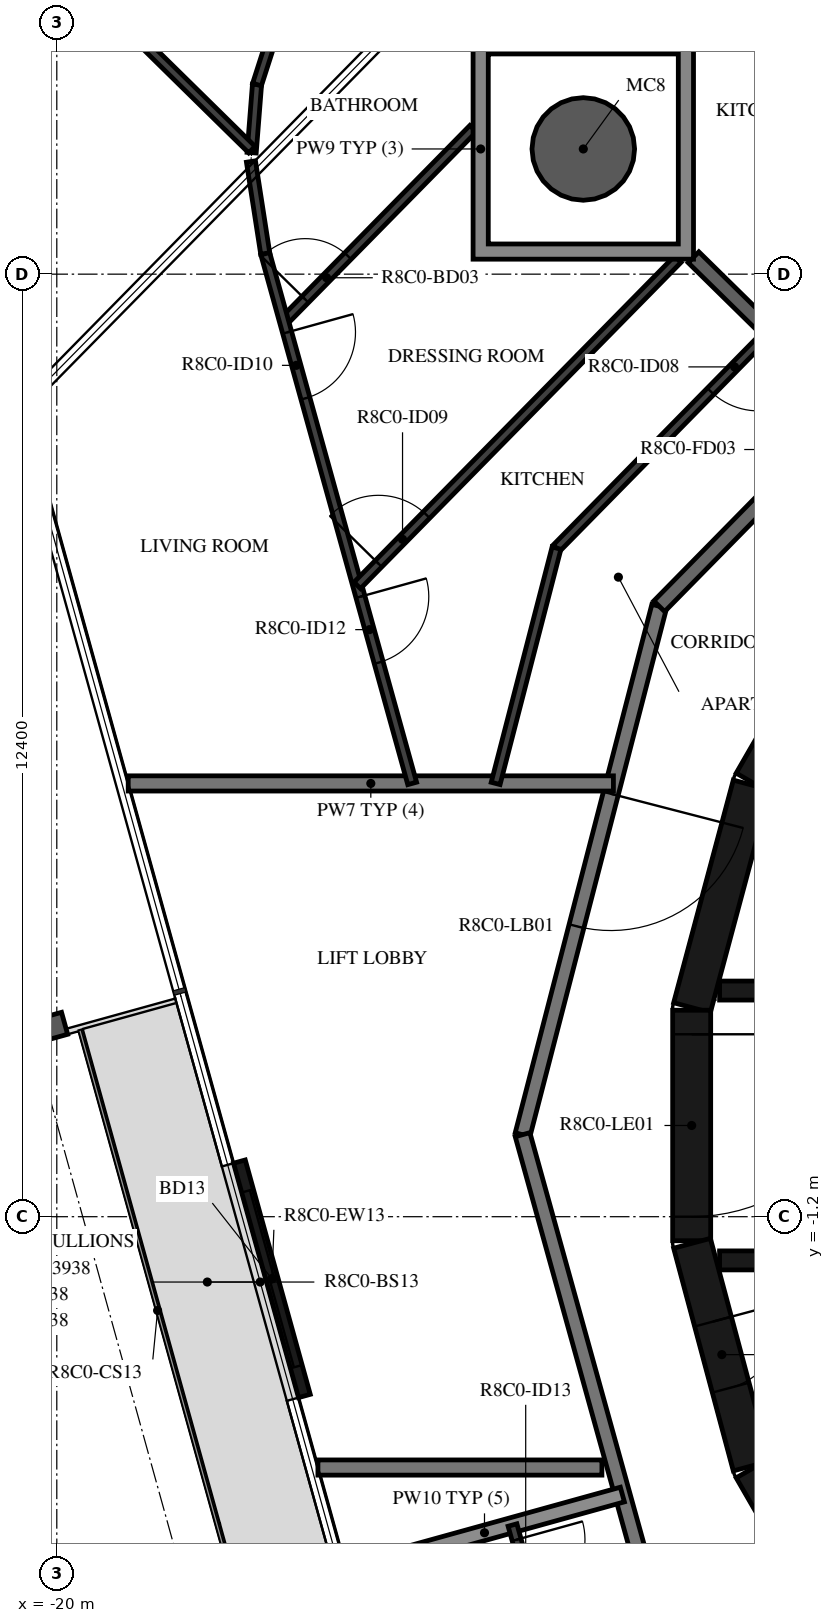
"""IFC4 building model, lengths in metres.
Left out: names, types, materials, properties, quantities, classifications, styles, units other than length and angle.
Written with IfcOpenShell. Run it as: python <this file> out.ifc"""

import sys

from ifc_helpers import new_model, si_unit, direction, frame, frame_2d, origin, origin_2d, place, context, subcontext, project, spatial, polyline, rectangle, hollow_circle, i_section, outline, extrude, element, fill, save


model = new_model("IFC4")
c1 = context("Model", 3, precision=1e-05, world=origin(), true_north=direction((0.0, 1.0)))
c2 = subcontext(c1, "Body", "Model", "MODEL_VIEW")
j1 = project(units=[si_unit("LENGTHUNIT", "METRE"), si_unit("PLANEANGLEUNIT", "RADIAN")], contexts=[c1])
p1 = place(None, origin())
s1 = spatial("IfcSite", under=j1, at=p1, CompositionType="ELEMENT")
p2 = place(p1, origin())
s2 = spatial("IfcBuilding", under=s1, at=p2, CompositionType="ELEMENT")
p3 = place(p2, frame((0.0, 0.0, 319.2)))
s3 = spatial("IfcBuildingStorey", under=s2, at=p3, CompositionType="ELEMENT", Elevation=319.2)
p4 = place(p3, frame((-13.073, 12.847, -0.38), z_axis=(0.0, 0.0, 1.0), x_axis=(1.0, 0.0, 0.0)))
e1 = element("IfcColumn", 1, at=p4, inside=s3, PredefinedType="COLUMN", context=c2, shape_type="SweptSolid", body=[
    extrude(hollow_circle(Radius=0.675, WallThickness=0.03, at=origin_2d()), origin(), (0.0, 0.0, 1.0), 3.5),
])
p5 = place(p3, frame((-20.331, 1.224, -0.38), z_axis=(0.0, 0.0, 1.0), x_axis=(-0.267238143562, 0.963630517691, 0.0)))
e2 = element("IfcColumn", 2, at=p5, inside=s3, PredefinedType="COLUMN", context=c2, shape_type="SweptSolid", body=[
    extrude(i_section(OverallWidth=0.3, OverallDepth=0.9, WebThickness=0.019, FlangeThickness=0.035, FilletRadius=0.03, at=origin_2d()), origin(), (0.0, 0.0, 1.0), 3.5),
])
p6 = place(p3, frame((-17.598, -0.475, 0.0), z_axis=(0.0, 0.0, 1.0), x_axis=(0.267266077957, -0.963622770369, 0.0)))
e3 = element("IfcWall", 3, at=p6, inside=s3, PredefinedType="STANDARD", context=c2, shape_type="SweptSolid", body=[
    extrude(rectangle(XDim=3.2, YDim=0.16, at=frame_2d((1.6, 0.0))), origin(), (0.0, 0.0, 1.0), 3.12),
])
p7 = place(p6, frame((0.4, 0.0, 0.0)))
e4 = element("IfcOpeningElement", 4, at=p7, cuts=e3, PredefinedType="OPENING", context=c2, shape_type="SweptSolid", body=[
    extrude(rectangle(XDim=2.4, YDim=2.4, at=frame_2d((1.2, 1.2))), frame((0.0, 0.09, 0.0), z_axis=(0.0, -1.0, 0.0), x_axis=(1.0, 0.0, 0.0)), (0.0, 0.0, 1.0), 0.18),
])
for number, where, z_axis, x_axis in (
    (5, (-9.329, 7.137, 0.0), (0.0, 0.0, 1.0), (-0.5, -0.866, 0.0)),
    (6, (-10.858, 4.479, 0.0), (0.0, 0.0, 1.0), (-0.259, -0.966, 0.0)),
):
    element("IfcWall", number, at=place(p3, frame(where, z_axis=z_axis, x_axis=x_axis)), inside=s3, PredefinedType="SHEAR", context=c2, shape_type="SweptSolid", body=[
        extrude(rectangle(XDim=3.033, YDim=0.5, at=frame_2d((1.516, 0.0))), origin(), (0.0, 0.0, 1.0), 3.12),
    ])
p8 = place(p3, frame((-11.647, 1.516, 0.0), z_axis=(0.0, 0.0, 1.0), x_axis=(0.0, -1.0, 0.0)))
e7 = element("IfcWall", 7, at=p8, inside=s3, PredefinedType="SHEAR", context=c2, shape_type="SweptSolid", body=[
    extrude(rectangle(XDim=3.033, YDim=0.5, at=frame_2d((1.516, 0.0))), origin(), (0.0, 0.0, 1.0), 3.12),
])
p9 = place(p8, frame((0.316, 0.0, 0.0)))
e8 = element("IfcOpeningElement", 8, at=p9, cuts=e7, PredefinedType="OPENING", context=c2, shape_type="SweptSolid", body=[
    extrude(rectangle(XDim=2.4, YDim=2.1, at=frame_2d((1.2, 1.05))), frame((0.0, 0.26, 0.0), z_axis=(0.0, -1.0, 0.0), x_axis=(1.0, 0.0, 0.0)), (0.0, 0.0, 1.0), 0.52),
])
p10 = place(p3, frame((-11.643, -1.55, 0.0), z_axis=(0.0, 0.0, 1.0), x_axis=(0.258734743916, -0.965948410781, 0.0)))
e9 = element("IfcWall", 9, at=p10, inside=s3, PredefinedType="SHEAR", context=c2, shape_type="SweptSolid", body=[
    extrude(rectangle(XDim=3.033, YDim=0.5, at=frame_2d((1.516, 0.0))), origin(), (0.0, 0.0, 1.0), 3.12),
])
p11 = place(p10, frame((1.066, 0.0, 0.0)))
e10 = element("IfcOpeningElement", 10, at=p11, cuts=e9, PredefinedType="OPENING", context=c2, shape_type="SweptSolid", body=[
    extrude(rectangle(XDim=0.9, YDim=2.1, at=frame_2d((0.45, 1.05))), frame((0.0, 0.26, 0.0), z_axis=(0.0, -1.0, 0.0), x_axis=(1.0, 0.0, 0.0)), (0.0, 0.0, 1.0), 0.52),
])
p12 = place(p3, frame((-10.845, -4.51, 0.0), z_axis=(0.0, 0.0, 1.0), x_axis=(0.500087131594, -0.865975092491, 0.0)))
e11 = element("IfcWall", 11, at=p12, inside=s3, PredefinedType="SHEAR", context=c2, shape_type="SweptSolid", body=[
    extrude(rectangle(XDim=3.033, YDim=0.5, at=frame_2d((1.516, 0.0))), origin(), (0.0, 0.0, 1.0), 3.12),
])
p13 = place(p3, frame((-11.28, 1.775, 0.0), z_axis=(0.0, 0.0, 1.0), x_axis=(1.0, 0.0, 0.0)))
e12 = element("IfcWall", 12, at=p13, inside=s3, PredefinedType="SHEAR", context=c2, shape_type="SweptSolid", body=[
    extrude(rectangle(XDim=14.38, YDim=0.25, at=frame_2d((7.19, 0.0))), origin(), (0.0, 0.0, 1.0), 3.12),
])
p14 = place(p13, frame((3.305, 0.0, 0.0)))
e13 = element("IfcOpeningElement", 13, at=p14, cuts=e12, PredefinedType="OPENING", context=c2, shape_type="SweptSolid", body=[
    extrude(rectangle(XDim=0.9, YDim=2.1, at=frame_2d((0.45, 1.05))), frame((0.0, 0.135, 0.0), z_axis=(0.0, -1.0, 0.0), x_axis=(1.0, 0.0, 0.0)), (0.0, 0.0, 1.0), 0.27),
])
p15 = place(p13, frame((9.755, 0.0, 0.0)))
e14 = element("IfcOpeningElement", 14, at=p15, cuts=e12, PredefinedType="OPENING", context=c2, shape_type="SweptSolid", body=[
    extrude(rectangle(XDim=0.9, YDim=2.1, at=frame_2d((0.45, 1.05))), frame((0.0, 0.135, 0.0), z_axis=(0.0, -1.0, 0.0), x_axis=(1.0, 0.0, 0.0)), (0.0, 0.0, 1.0), 0.27),
])
p16 = place(p3, frame((-11.28, -1.775, 0.0), z_axis=(0.0, 0.0, 1.0), x_axis=(1.0, 0.0, 0.0)))
e15 = element("IfcWall", 15, at=p16, inside=s3, PredefinedType="SHEAR", context=c2, shape_type="SweptSolid", body=[
    extrude(rectangle(XDim=14.38, YDim=0.25, at=frame_2d((7.19, 0.0))), origin(), (0.0, 0.0, 1.0), 3.12),
])
p17 = place(p16, frame((6.43, 0.0, 0.0)))
e16 = element("IfcOpeningElement", 16, at=p17, cuts=e15, PredefinedType="OPENING", context=c2, shape_type="SweptSolid", body=[
    extrude(rectangle(XDim=1.1, YDim=2.1, at=frame_2d((0.55, 1.05))), frame((0.0, 0.135, 0.0), z_axis=(0.0, -1.0, 0.0), x_axis=(1.0, 0.0, 0.0)), (0.0, 0.0, 1.0), 0.27),
])
p18 = place(p16, frame((8.58, 0.0, 0.0)))
e17 = element("IfcOpeningElement", 17, at=p18, cuts=e15, PredefinedType="OPENING", context=c2, shape_type="SweptSolid", body=[
    extrude(rectangle(XDim=1.1, YDim=2.1, at=frame_2d((0.55, 1.05))), frame((0.0, 0.135, 0.0), z_axis=(0.0, -1.0, 0.0), x_axis=(1.0, 0.0, 0.0)), (0.0, 0.0, 1.0), 0.27),
])
p19 = place(p16, frame((10.73, 0.0, 0.0)))
e18 = element("IfcOpeningElement", 18, at=p19, cuts=e15, PredefinedType="OPENING", context=c2, shape_type="SweptSolid", body=[
    extrude(rectangle(XDim=1.1, YDim=2.1, at=frame_2d((0.55, 1.05))), frame((0.0, 0.135, 0.0), z_axis=(0.0, -1.0, 0.0), x_axis=(1.0, 0.0, 0.0)), (0.0, 0.0, 1.0), 0.27),
])
p20 = place(p16, frame((3.305, 0.0, 0.0)))
e19 = element("IfcOpeningElement", 19, at=p20, cuts=e15, PredefinedType="OPENING", context=c2, shape_type="SweptSolid", body=[
    extrude(rectangle(XDim=0.9, YDim=2.1, at=frame_2d((0.45, 1.05))), frame((0.0, 0.135, 0.0), z_axis=(0.0, -1.0, 0.0), x_axis=(1.0, 0.0, 0.0)), (0.0, 0.0, 1.0), 0.27),
])
p21 = place(p16, frame((12.98, 0.0, 0.0)))
e20 = element("IfcOpeningElement", 20, at=p21, cuts=e15, PredefinedType="OPENING", context=c2, shape_type="SweptSolid", body=[
    extrude(rectangle(XDim=0.9, YDim=2.1, at=frame_2d((0.45, 1.05))), frame((0.0, 0.135, 0.0), z_axis=(0.0, -1.0, 0.0), x_axis=(1.0, 0.0, 0.0)), (0.0, 0.0, 1.0), 0.27),
])
p22 = place(p3, frame((-12.074, 6.831, 0.0), z_axis=(0.0, 0.0, 1.0), x_axis=(-0.250391063186, -0.968144780225, 0.0)))
e21 = element("IfcWall", 21, at=p22, inside=s3, PredefinedType="STANDARD", context=c2, shape_type="SweptSolid", body=[
    extrude(rectangle(XDim=7.181, YDim=0.2, at=frame_2d((3.591, 0.0))), origin(), (0.0, 0.0, 1.0), 3.12),
])
p23 = place(p22, frame((2.548, 0.0, 0.0)))
e22 = element("IfcOpeningElement", 22, at=p23, cuts=e21, PredefinedType="OPENING", context=c2, shape_type="SweptSolid", body=[
    extrude(rectangle(XDim=1.8, YDim=2.1, at=frame_2d((0.9, 1.05))), frame((0.0, 0.11, 0.0), z_axis=(0.0, -1.0, 0.0), x_axis=(1.0, 0.0, 0.0)), (0.0, 0.0, 1.0), 0.22),
])
p24 = place(p3, frame((-13.872, -0.121, 0.0), z_axis=(0.0, 0.0, 1.0), x_axis=(0.267254575108, -0.963625960674, 0.0)))
e23 = element("IfcWall", 23, at=p24, inside=s3, PredefinedType="STANDARD", context=c2, shape_type="SweptSolid", body=[
    extrude(rectangle(XDim=7.181, YDim=0.2, at=frame_2d((3.591, 0.0))), origin(), (0.0, 0.0, 1.0), 3.12),
])
p25 = place(p3, frame((-7.041, 11.953, 0.0), z_axis=(0.0, 0.0, 1.0), x_axis=(-0.70090916255, -0.713250549143, 0.0)))
e24 = element("IfcWall", 24, at=p25, inside=s3, PredefinedType="STANDARD", context=c2, shape_type="SweptSolid", body=[
    extrude(rectangle(XDim=7.181, YDim=0.2, at=frame_2d((3.59, 0.0))), origin(), (0.0, 0.0, 1.0), 3.12),
])
p26 = place(p25, frame((2.39, 0.0, 0.0)))
e25 = element("IfcOpeningElement", 25, at=p26, cuts=e24, PredefinedType="OPENING", context=c2, shape_type="SweptSolid", body=[
    extrude(rectangle(XDim=1.0, YDim=2.1, at=frame_2d((0.5, 1.05))), frame((0.0, 0.11, 0.0), z_axis=(0.0, -1.0, 0.0), x_axis=(1.0, 0.0, 0.0)), (0.0, 0.0, 1.0), 0.22),
])
p27 = place(p25, frame((3.791, 0.0, 0.0)))
e26 = element("IfcOpeningElement", 26, at=p27, cuts=e24, PredefinedType="OPENING", context=c2, shape_type="SweptSolid", body=[
    extrude(rectangle(XDim=1.0, YDim=2.1, at=frame_2d((0.5, 1.05))), frame((0.0, 0.11, 0.0), z_axis=(0.0, -1.0, 0.0), x_axis=(1.0, 0.0, 0.0)), (0.0, 0.0, 1.0), 0.22),
])
p28 = place(p3, frame((-12.677, 4.5, 0.0), z_axis=(0.0, 0.0, 1.0), x_axis=(-1.0, 0.0, 0.0)))
e27 = element("IfcWall", 27, at=p28, inside=s3, PredefinedType="STANDARD", context=c2, shape_type="SweptSolid", body=[
    extrude(rectangle(XDim=6.383, YDim=0.2, at=frame_2d((3.192, 0.0))), origin(), (0.0, 0.0, 1.0), 3.12),
])
p29 = place(p3, frame((-16.564, -4.5, 0.0), z_axis=(0.0, 0.0, 1.0), x_axis=(1.0, 0.0, 0.0)))
e28 = element("IfcWall", 28, at=p29, inside=s3, PredefinedType="STANDARD", context=c2, shape_type="SweptSolid", body=[
    extrude(rectangle(XDim=3.736, YDim=0.2, at=frame_2d((1.868, 0.0))), origin(), (0.0, 0.0, 1.0), 3.12),
])
p30 = place(p3, frame((-11.623, 11.422, 0.0), z_axis=(0.0, 0.0, 1.0), x_axis=(0.713233657229, -0.700926351478, 0.0)))
e29 = element("IfcWall", 29, at=p30, inside=s3, PredefinedType="STANDARD", context=c2, shape_type="SweptSolid", body=[
    extrude(rectangle(XDim=2.896, YDim=0.2, at=frame_2d((1.448, 0.0))), origin(), (0.0, 0.0, 1.0), 3.12),
])
p31 = place(p3, frame((-16.187, -5.862, 0.0), z_axis=(0.0, 0.0, 1.0), x_axis=(0.963631166683, 0.267235803358, 0.0)))
e30 = element("IfcWall", 30, at=p31, inside=s3, PredefinedType="STANDARD", context=c2, shape_type="SweptSolid", body=[
    extrude(rectangle(XDim=3.765, YDim=0.2, at=frame_2d((1.882, 0.0))), origin(), (0.0, 0.0, 1.0), 2.73),
])
p32 = place(p3, frame((-8.413, 12.698, 0.0), z_axis=(0.0, 0.0, 1.0), x_axis=(-0.700901588882, -0.713257991686, 0.0)))
e31 = element("IfcWall", 31, at=p32, inside=s3, PredefinedType="PARTITIONING", context=c2, shape_type="SweptSolid", body=[
    extrude(rectangle(XDim=7.153, YDim=0.12, at=frame_2d((3.576, 0.0))), origin(), (0.0, 0.0, 1.0), 3.12),
])
p33 = place(p32, frame((3.36, 0.0, 0.0)))
e32 = element("IfcOpeningElement", 32, at=p33, cuts=e31, PredefinedType="OPENING", context=c2, shape_type="SweptSolid", body=[
    extrude(rectangle(XDim=0.9, YDim=2.1, at=frame_2d((0.45, 1.05))), frame((0.0, 0.07, 0.0), z_axis=(0.0, -1.0, 0.0), x_axis=(1.0, 0.0, 0.0)), (0.0, 0.0, 1.0), 0.14),
])
p34 = place(p3, frame((-13.426, 7.596, 0.0), z_axis=(0.0, 0.0, 1.0), x_axis=(-0.250342106136, -0.968157440655, 0.0)))
e33 = element("IfcWall", 33, at=p34, inside=s3, PredefinedType="PARTITIONING", context=c2, shape_type="SweptSolid", body=[
    extrude(rectangle(XDim=3.198, YDim=0.12, at=frame_2d((1.599, 0.0))), origin(), (0.0, 0.0, 1.0), 3.12),
])
p35 = place(p3, frame((-17.437, 12.798, 0.0), z_axis=(0.0, 0.0, 1.0), x_axis=(0.078482315782, 0.996915506003, 0.0)))
e34 = element("IfcWall", 34, at=p35, inside=s3, PredefinedType="PARTITIONING", context=c2, shape_type="SweptSolid", body=[
    extrude(rectangle(XDim=0.899, YDim=0.12, at=frame_2d((0.449, 0.0))), origin(), (0.0, 0.0, 1.0), 3.12),
])
p36 = place(p3, frame((-17.366, 13.695, 0.0), z_axis=(0.0, 0.0, 1.0), x_axis=(0.306405887477, 0.951900957096, 0.0)))
e35 = element("IfcWall", 35, at=p36, inside=s3, PredefinedType="PARTITIONING", context=c2, shape_type="SweptSolid", body=[
    extrude(rectangle(XDim=1.016, YDim=0.12, at=frame_2d((0.508, 0.0))), origin(), (0.0, 0.0, 1.0), 3.12),
])
p37 = place(p3, frame((-20.465, 15.817, 0.0), z_axis=(0.0, 0.0, 1.0), x_axis=(0.713254811643, -0.700904824971, 0.0)))
e36 = element("IfcWall", 36, at=p37, inside=s3, PredefinedType="PARTITIONING", context=c2, shape_type="SweptSolid", body=[
    extrude(rectangle(XDim=4.25, YDim=0.12, at=frame_2d((2.125, 0.0))), origin(), (0.0, 0.0, 1.0), 3.12),
])
p38 = place(p37, frame((0.4, 0.0, 0.0)))
e37 = element("IfcOpeningElement", 37, at=p38, cuts=e36, PredefinedType="OPENING", context=c2, shape_type="SweptSolid", body=[
    extrude(rectangle(XDim=0.9, YDim=2.1, at=frame_2d((0.45, 1.05))), frame((0.0, 0.07, 0.0), z_axis=(0.0, -1.0, 0.0), x_axis=(1.0, 0.0, 0.0)), (0.0, 0.0, 1.0), 0.14),
])
p39 = place(p3, frame((-17.011, 10.582, 0.0), z_axis=(0.0, 0.0, 1.0), x_axis=(0.700924288011, 0.713235685083, 0.0)))
e38 = element("IfcWall", 38, at=p39, inside=s3, PredefinedType="PARTITIONING", context=c2, shape_type="SweptSolid", body=[
    extrude(rectangle(XDim=3.55, YDim=0.12, at=frame_2d((1.775, 0.0))), origin(), (0.0, 0.0, 1.0), 3.12),
])
p40 = place(p39, frame((0.4, 0.0, 0.0)))
e39 = element("IfcOpeningElement", 39, at=p40, cuts=e38, PredefinedType="OPENING", context=c2, shape_type="SweptSolid", body=[
    extrude(rectangle(XDim=0.8, YDim=2.1, at=frame_2d((0.4, 1.05))), frame((0.0, 0.07, 0.0), z_axis=(0.0, -1.0, 0.0), x_axis=(1.0, 0.0, 0.0)), (0.0, 0.0, 1.0), 0.14),
])
p41 = place(p3, frame((-17.446, 12.682, 0.0), z_axis=(0.0, 0.0, 1.0), x_axis=(0.153612025092, -0.988131239131, 0.0)))
e40 = element("IfcWall", 40, at=p41, inside=s3, PredefinedType="PARTITIONING", context=c2, shape_type="SweptSolid", body=[
    extrude(rectangle(XDim=1.227, YDim=0.12, at=frame_2d((0.614, 0.0))), origin(), (0.0, 0.0, 1.0), 3.12),
])
p42 = place(p3, frame((-17.257, 11.469, 0.0), z_axis=(0.0, 0.0, 1.0), x_axis=(0.267222501114, -0.963634855585, 0.0)))
e41 = element("IfcWall", 41, at=p42, inside=s3, PredefinedType="PARTITIONING", context=c2, shape_type="SweptSolid", body=[
    extrude(rectangle(XDim=7.232, YDim=0.12, at=frame_2d((3.616, 0.0))), origin(), (0.0, 0.0, 1.0), 3.12),
])
p43 = place(p42, frame((1.074, 0.0, 0.0)))
e42 = element("IfcOpeningElement", 42, at=p43, cuts=e41, PredefinedType="OPENING", context=c2, shape_type="SweptSolid", body=[
    extrude(rectangle(XDim=0.9, YDim=2.1, at=frame_2d((0.45, 1.05))), frame((0.0, 0.07, 0.0), z_axis=(0.0, -1.0, 0.0), x_axis=(1.0, 0.0, 0.0)), (0.0, 0.0, 1.0), 0.14),
])
p44 = place(p42, frame((4.682, 0.0, 0.0)))
e43 = element("IfcOpeningElement", 43, at=p44, cuts=e41, PredefinedType="OPENING", context=c2, shape_type="SweptSolid", body=[
    extrude(rectangle(XDim=0.9, YDim=2.1, at=frame_2d((0.45, 1.05))), frame((0.0, 0.07, 0.0), z_axis=(0.0, -1.0, 0.0), x_axis=(1.0, 0.0, 0.0)), (0.0, 0.0, 1.0), 0.14),
])
p45 = place(p3, frame((-16.047, 7.105, 0.0), z_axis=(0.0, 0.0, 1.0), x_axis=(0.700892382646, 0.713267038316, 0.0)))
e44 = element("IfcWall", 44, at=p45, inside=s3, PredefinedType="PARTITIONING", context=c2, shape_type="SweptSolid", body=[
    extrude(rectangle(XDim=6.017, YDim=0.12, at=frame_2d((3.009, 0.0))), origin(), (0.0, 0.0, 1.0), 3.12),
])
p46 = place(p45, frame((0.4, 0.0, 0.0)))
e45 = element("IfcOpeningElement", 45, at=p46, cuts=e44, PredefinedType="OPENING", context=c2, shape_type="SweptSolid", body=[
    extrude(rectangle(XDim=0.9, YDim=2.1, at=frame_2d((0.45, 1.05))), frame((0.0, 0.07, 0.0), z_axis=(0.0, -1.0, 0.0), x_axis=(1.0, 0.0, 0.0)), (0.0, 0.0, 1.0), 0.14),
])
p47 = place(p3, frame((-14.005, -5.256, 0.0), z_axis=(0.0, 0.0, 1.0), x_axis=(0.267200500487, -0.963640956238, 0.0)))
e46 = element("IfcWall", 46, at=p47, inside=s3, PredefinedType="PARTITIONING", context=c2, shape_type="SweptSolid", body=[
    extrude(rectangle(XDim=2.67, YDim=0.12, at=frame_2d((1.335, 0.0))), origin(), (0.0, 0.0, 1.0), 3.12),
])
p48 = place(p47, frame((0.2, 0.0, 0.0)))
e47 = element("IfcOpeningElement", 47, at=p48, cuts=e46, PredefinedType="OPENING", context=c2, shape_type="SweptSolid", body=[
    extrude(rectangle(XDim=0.9, YDim=2.1, at=frame_2d((0.45, 1.05))), frame((0.0, 0.07, 0.0), z_axis=(0.0, -1.0, 0.0), x_axis=(1.0, 0.0, 0.0)), (0.0, 0.0, 1.0), 0.14),
])
p49 = place(p3, origin())
e48 = element("IfcWall", 48, at=p49, inside=s3, PredefinedType="STANDARD", context=c2, shape_type="SweptSolid", body=[
    extrude(outline(polyline([(-11.623, 14.297), (-11.623, 11.397), (-14.523, 11.397), (-14.523, 14.297), (-11.623, 14.297)]), holes=[polyline([(-14.323, 11.597), (-11.823, 11.597), (-11.823, 14.097), (-14.323, 14.097), (-14.323, 11.597)])]), origin(), (0.0, 0.0, 1.0), 3.12),
])
p50 = place(p7, origin())
e49 = element("IfcDoor", 49, at=p50, inside=s3, OperationType="DOUBLE_DOOR_SLIDING", PredefinedType="DOOR", context=c2, shape_type="SweptSolid", body=[
    extrude(rectangle(XDim=2.4, YDim=2.4, at=frame_2d((1.2, 1.2))), frame((0.0, 0.025, 0.0), z_axis=(0.0, -1.0, 0.0), x_axis=(1.0, 0.0, 0.0)), (0.0, 0.0, 1.0), 0.05),
])
fill(e4, e49)
p51 = place(p9, origin())
e50 = element("IfcDoor", 50, at=p51, inside=s3, OperationType="DOUBLE_DOOR_SINGLE_SWING", PredefinedType="DOOR", context=c2, shape_type="SweptSolid", body=[
    extrude(rectangle(XDim=2.4, YDim=2.1, at=frame_2d((1.2, 1.05))), frame((0.0, 0.025, 0.0), z_axis=(0.0, -1.0, 0.0), x_axis=(1.0, 0.0, 0.0)), (0.0, 0.0, 1.0), 0.05),
])
fill(e8, e50)
p52 = place(p11, origin())
e51 = element("IfcDoor", 51, at=p52, inside=s3, OperationType="SINGLE_SWING_RIGHT", PredefinedType="DOOR", context=c2, shape_type="SweptSolid", body=[
    extrude(rectangle(XDim=0.9, YDim=2.1, at=frame_2d((0.45, 1.05))), frame((0.0, 0.025, 0.0), z_axis=(0.0, -1.0, 0.0), x_axis=(1.0, 0.0, 0.0)), (0.0, 0.0, 1.0), 0.05),
])
fill(e10, e51)
p53 = place(p33, origin())
e52 = element("IfcDoor", 52, at=p53, inside=s3, OperationType="SINGLE_SWING_LEFT", PredefinedType="DOOR", context=c2, shape_type="SweptSolid", body=[
    extrude(rectangle(XDim=0.9, YDim=2.1, at=frame_2d((0.45, 1.05))), frame((0.0, 0.025, 0.0), z_axis=(0.0, -1.0, 0.0), x_axis=(1.0, 0.0, 0.0)), (0.0, 0.0, 1.0), 0.05),
])
fill(e32, e52)
p54 = place(p46, origin())
e53 = element("IfcDoor", 53, at=p54, inside=s3, OperationType="SINGLE_SWING_LEFT", PredefinedType="DOOR", context=c2, shape_type="SweptSolid", body=[
    extrude(rectangle(XDim=0.9, YDim=2.1, at=frame_2d((0.45, 1.05))), frame((0.0, 0.025, 0.0), z_axis=(0.0, -1.0, 0.0), x_axis=(1.0, 0.0, 0.0)), (0.0, 0.0, 1.0), 0.05),
])
fill(e45, e53)
p55 = place(p40, origin())
e54 = element("IfcDoor", 54, at=p55, inside=s3, OperationType="SINGLE_SWING_LEFT", PredefinedType="DOOR", context=c2, shape_type="SweptSolid", body=[
    extrude(rectangle(XDim=0.8, YDim=2.1, at=frame_2d((0.4, 1.05))), frame((0.0, 0.025, 0.0), z_axis=(0.0, -1.0, 0.0), x_axis=(1.0, 0.0, 0.0)), (0.0, 0.0, 1.0), 0.05),
])
fill(e39, e54)
p56 = place(p43, origin())
e55 = element("IfcDoor", 55, at=p56, inside=s3, OperationType="SINGLE_SWING_LEFT", PredefinedType="DOOR", context=c2, shape_type="SweptSolid", body=[
    extrude(rectangle(XDim=0.9, YDim=2.1, at=frame_2d((0.45, 1.05))), frame((0.0, 0.025, 0.0), z_axis=(0.0, -1.0, 0.0), x_axis=(1.0, 0.0, 0.0)), (0.0, 0.0, 1.0), 0.05),
])
fill(e42, e55)
p57 = place(p44, origin())
e56 = element("IfcDoor", 56, at=p57, inside=s3, OperationType="SINGLE_SWING_RIGHT", PredefinedType="DOOR", context=c2, shape_type="SweptSolid", body=[
    extrude(rectangle(XDim=0.9, YDim=2.1, at=frame_2d((0.45, 1.05))), frame((0.0, 0.025, 0.0), z_axis=(0.0, -1.0, 0.0), x_axis=(1.0, 0.0, 0.0)), (0.0, 0.0, 1.0), 0.05),
])
fill(e43, e56)
p58 = place(p48, origin())
e57 = element("IfcDoor", 57, at=p58, inside=s3, OperationType="SINGLE_SWING_RIGHT", PredefinedType="DOOR", context=c2, shape_type="SweptSolid", body=[
    extrude(rectangle(XDim=0.9, YDim=2.1, at=frame_2d((0.45, 1.05))), frame((0.0, 0.025, 0.0), z_axis=(0.0, -1.0, 0.0), x_axis=(1.0, 0.0, 0.0)), (0.0, 0.0, 1.0), 0.05),
])
fill(e47, e57)
p59 = place(p23, origin())
e58 = element("IfcDoor", 58, at=p59, inside=s3, OperationType="DOUBLE_DOOR_SINGLE_SWING", PredefinedType="DOOR", context=c2, shape_type="SweptSolid", body=[
    extrude(rectangle(XDim=1.8, YDim=2.1, at=frame_2d((0.9, 1.05))), frame((0.0, 0.025, 0.0), z_axis=(0.0, -1.0, 0.0), x_axis=(1.0, 0.0, 0.0)), (0.0, 0.0, 1.0), 0.05),
])
fill(e22, e58)
save(model, sys.argv[1])
